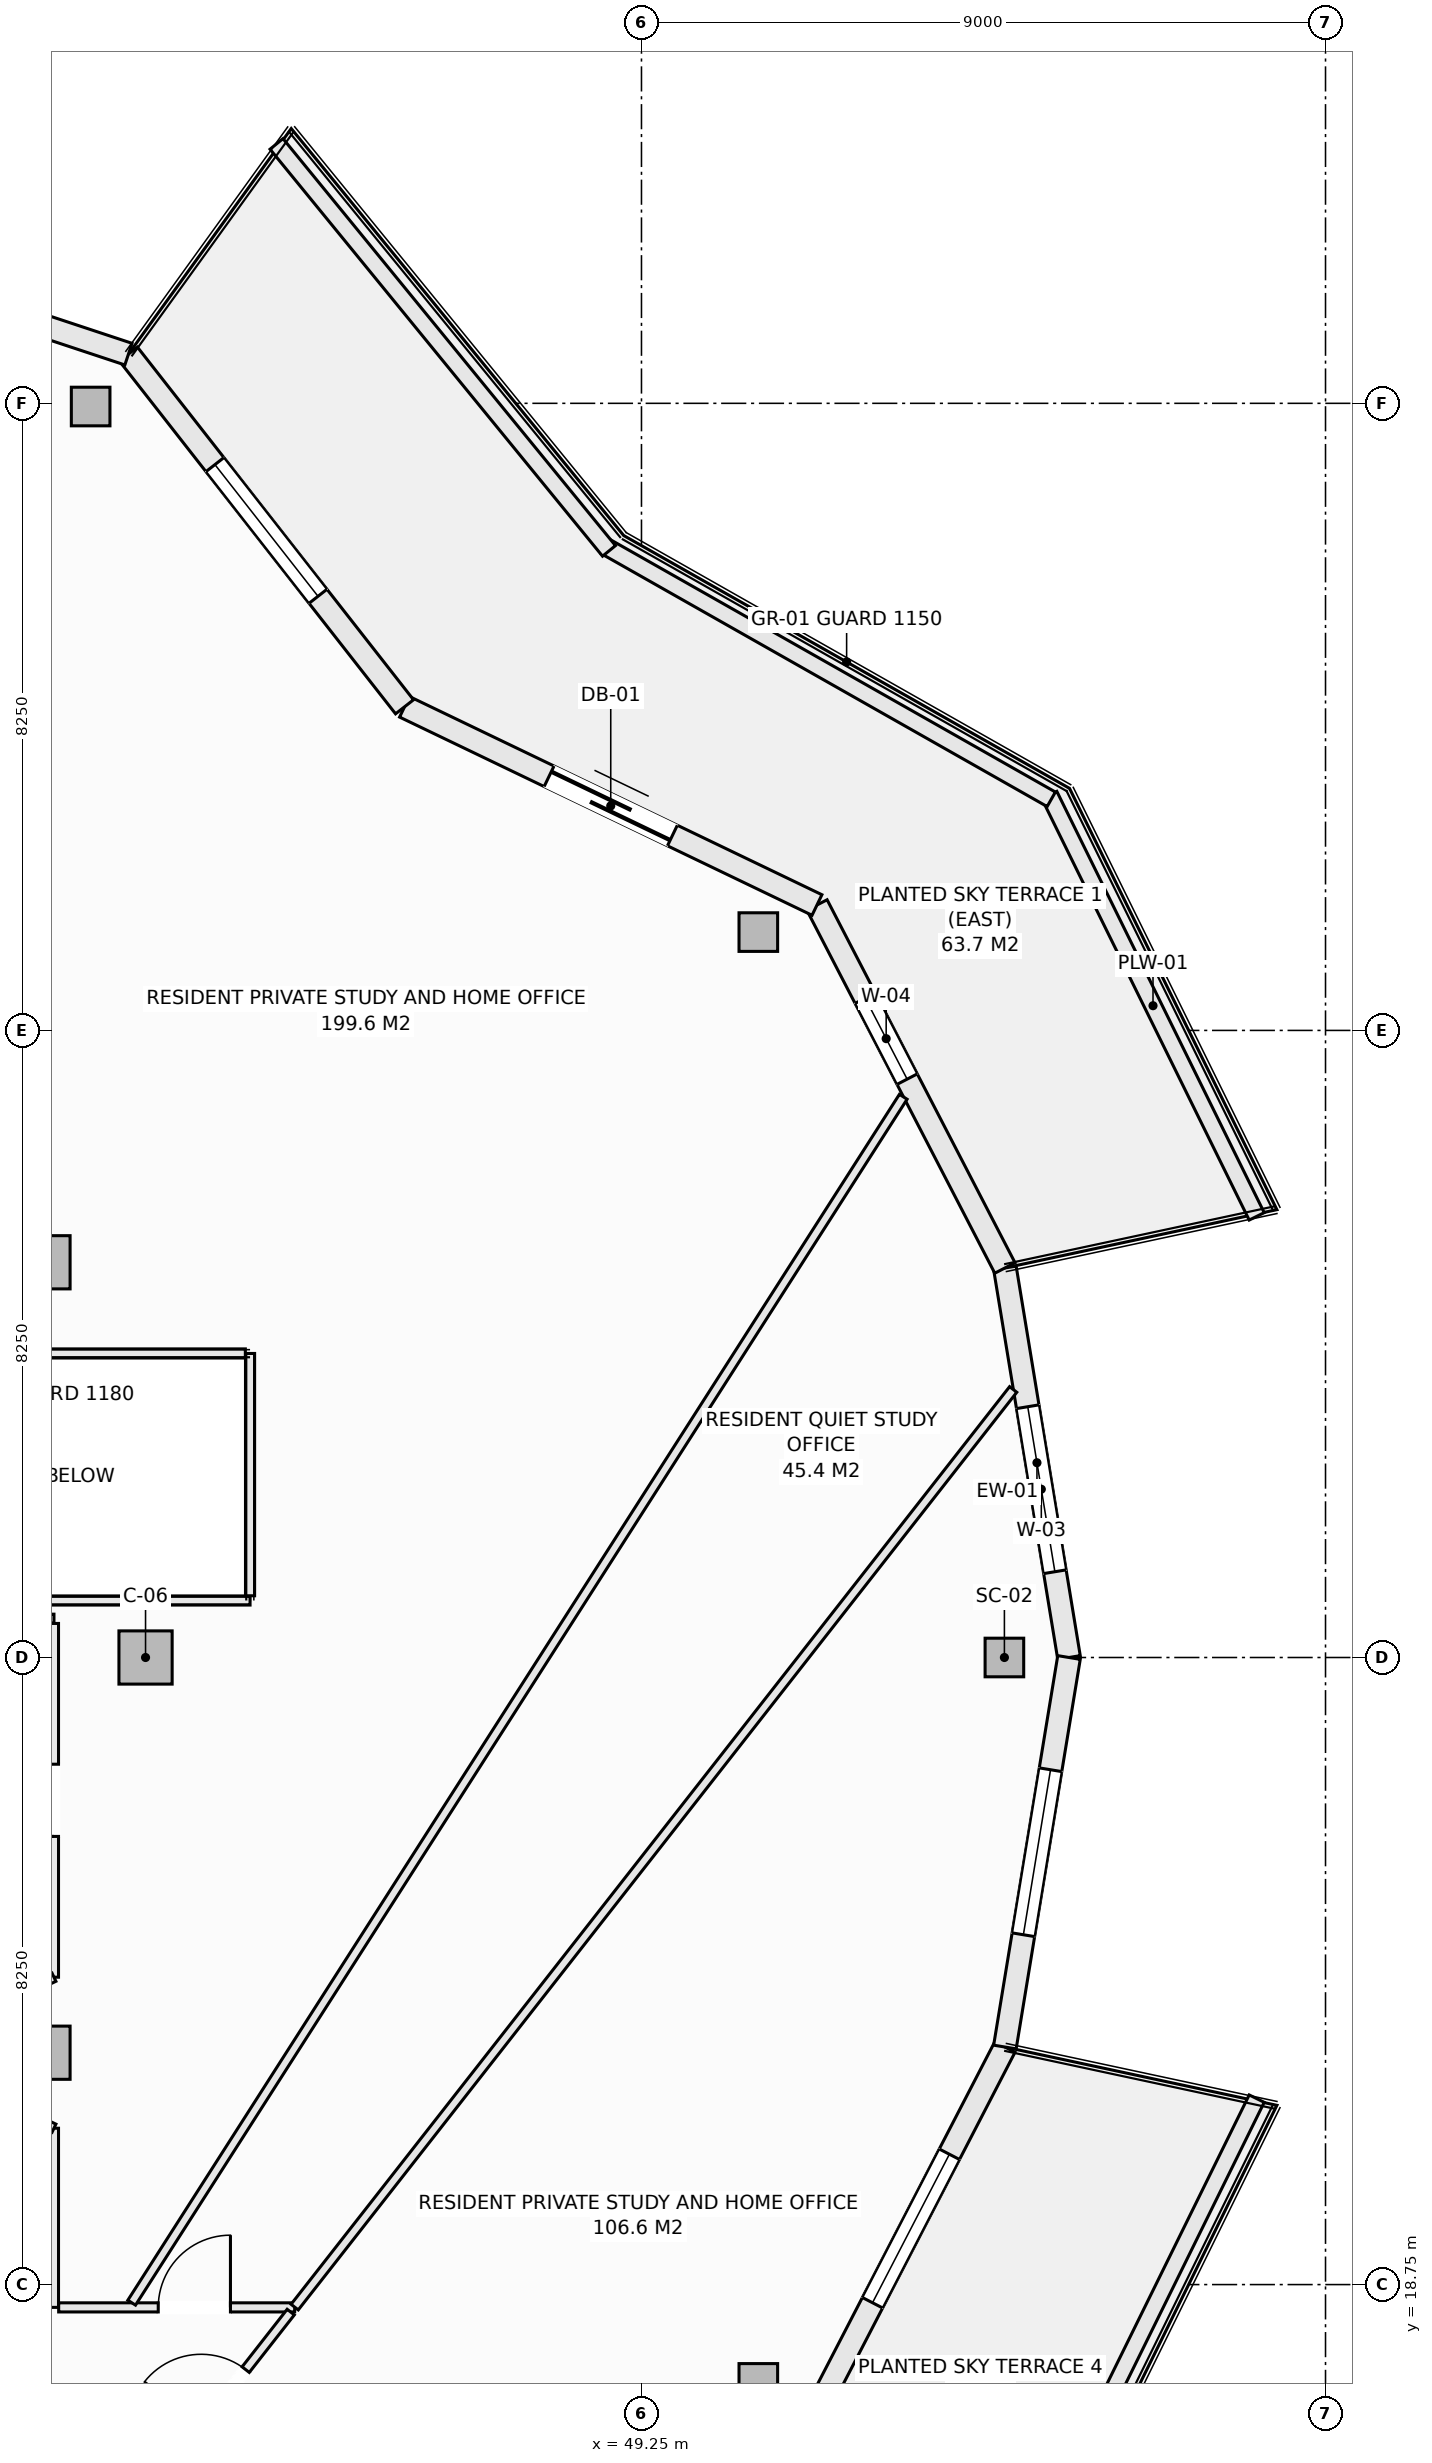
"""IFC4 building model, lengths in metres.
Left out: names, types, materials, properties, quantities, classifications, styles, units other than length and angle.
Written with IfcOpenShell. Run it as: python <this file> out.ifc"""

import sys

from ifc_helpers import new_model, si_unit, direction, frame, frame_2d, origin, origin_2d, place, context, subcontext, project, spatial, rectangle, hollow_rectangle, extrude, element, fill, save


model = new_model("IFC4")
c1 = context("Model", 3, precision=1e-05, world=origin(), true_north=direction((0.0, 1.0)))
c2 = subcontext(c1, "Body", "Model", "MODEL_VIEW")
j1 = project(units=[si_unit("LENGTHUNIT", "METRE"), si_unit("PLANEANGLEUNIT", "RADIAN")], contexts=[c1])
p1 = place(None, origin())
s1 = spatial("IfcSite", under=j1, at=p1, CompositionType="ELEMENT")
p2 = place(p1, origin())
s2 = spatial("IfcBuilding", under=s1, at=p2, CompositionType="ELEMENT")
p3 = place(p2, frame((0.0, 0.0, 209.6)))
s3 = spatial("IfcBuildingStorey", under=s2, at=p3, CompositionType="ELEMENT", Elevation=209.6)
for number, where, z_axis, x_axis in (
    (1, (54.025, 27.0, -0.27), (0.0, 0.0, 1.0), (1.0, 0.0, 0.0)),
    (2, (50.787, 36.544, -0.27), (0.0, 0.0, 1.0), (1.0, 0.0, 0.0)),
    (3, (42.003, 43.458, -0.27), (0.0, 0.0, 1.0), (1.0, 0.0, 0.0)),
    (4, (50.787, 17.456, -0.27), (0.0, 0.0, 1.0), (1.0, 0.0, 0.0)),
):
    element("IfcColumn", number, at=place(p3, frame(where, z_axis=z_axis, x_axis=x_axis)), inside=s3, PredefinedType="COLUMN", context=c2, shape_type="SweptSolid", body=[
        extrude(hollow_rectangle(XDim=0.508, YDim=0.508, WallThickness=0.019, at=origin_2d()), origin(), (0.0, 0.0, 1.0), 3.3),
    ])
for number, where, z_axis, x_axis in (
    (5, (42.725, 27.0, -0.27), (0.0, 0.0, 1.0), (1.0, 0.0, 0.0)),
    (6, (41.382, 32.199, -0.27), (0.0, 0.0, 1.0), (1.0, 0.0, 0.0)),
    (7, (41.382, 21.801, -0.27), (0.0, 0.0, 1.0), (1.0, 0.0, 0.0)),
):
    element("IfcColumn", number, at=place(p3, frame(where, z_axis=z_axis, x_axis=x_axis)), inside=s3, PredefinedType="COLUMN", context=c2, shape_type="SweptSolid", body=[
        extrude(rectangle(XDim=0.7, YDim=0.7, at=origin_2d()), origin(), (0.0, 0.0, 1.0), 3.3),
    ])
p4 = place(p3, frame((54.032, 32.125, 0.0), z_axis=(0.0, 0.0, 1.0), x_axis=(0.16237087798, -0.986729799886, 0.0)))
e8 = element("IfcWall", 8, at=p4, inside=s3, PredefinedType="SOLIDWALL", context=c2, shape_type="SweptSolid", body=[
    extrude(rectangle(XDim=5.193, YDim=0.3, at=frame_2d((2.597, 0.0))), origin(), (0.0, 0.0, 1.0), 2.605),
])
p5 = place(p4, frame((1.85, 0.0, 0.72)))
e9 = element("IfcOpeningElement", 9, at=p5, cuts=e8, PredefinedType="OPENING", context=c2, shape_type="SweptSolid", body=[
    extrude(rectangle(XDim=2.2, YDim=1.65, at=frame_2d((1.1, 0.825))), frame((0.0, 0.16, 0.0), z_axis=(0.0, -1.0, 0.0), x_axis=(1.0, 0.0, 0.0)), (0.0, 0.0, 1.0), 0.32),
])
p6 = place(p3, frame((51.559, 36.9, 0.0), z_axis=(0.0, 0.0, 1.0), x_axis=(0.459808219482, -0.888018243786, 0.0)))
e10 = element("IfcWall", 10, at=p6, inside=s3, PredefinedType="SOLIDWALL", context=c2, shape_type="SweptSolid", body=[
    extrude(rectangle(XDim=5.378, YDim=0.3, at=frame_2d((2.689, 0.0))), origin(), (0.0, 0.0, 1.0), 2.605),
])
p7 = place(p6, frame((1.38, 0.0, 0.72)))
e11 = element("IfcOpeningElement", 11, at=p7, cuts=e10, PredefinedType="OPENING", context=c2, shape_type="SweptSolid", body=[
    extrude(rectangle(XDim=1.2, YDim=1.65, at=frame_2d((0.6, 0.825))), frame((0.0, 0.16, 0.0), z_axis=(0.0, -1.0, 0.0), x_axis=(1.0, 0.0, 0.0)), (0.0, 0.0, 1.0), 0.32),
])
p8 = place(p3, frame((46.133, 39.507, 0.0), z_axis=(0.0, 0.0, 1.0), x_axis=(0.901348331142, -0.433094892545, 0.0)))
e12 = element("IfcWall", 12, at=p8, inside=s3, PredefinedType="SOLIDWALL", context=c2, shape_type="SweptSolid", body=[
    extrude(rectangle(XDim=6.021, YDim=0.3, at=frame_2d((3.01, 0.0))), origin(), (0.0, 0.0, 1.0), 2.605),
])
p9 = place(p8, frame((2.11, 0.0, 0.0)))
e13 = element("IfcOpeningElement", 13, at=p9, cuts=e12, PredefinedType="OPENING", context=c2, shape_type="SweptSolid", body=[
    extrude(rectangle(XDim=1.8, YDim=2.25, at=frame_2d((0.9, 1.125))), frame((0.0, 0.16, 0.0), z_axis=(0.0, -1.0, 0.0), x_axis=(1.0, 0.0, 0.0)), (0.0, 0.0, 1.0), 0.32),
])
p10 = place(p3, frame((42.5, 44.147, 0.0), z_axis=(0.0, 0.0, 1.0), x_axis=(0.616450126935, -0.787393955401, 0.0)))
e14 = element("IfcWall", 14, at=p10, inside=s3, PredefinedType="SOLIDWALL", context=c2, shape_type="SweptSolid", body=[
    extrude(rectangle(XDim=5.893, YDim=0.3, at=frame_2d((2.946, 0.0))), origin(), (0.0, 0.0, 1.0), 2.605),
])
p11 = place(p10, frame((1.846, 0.0, 0.72)))
e15 = element("IfcOpeningElement", 15, at=p11, cuts=e14, PredefinedType="OPENING", context=c2, shape_type="SweptSolid", body=[
    extrude(rectangle(XDim=2.2, YDim=1.65, at=frame_2d((1.1, 0.825))), frame((0.0, 0.16, 0.0), z_axis=(0.0, -1.0, 0.0), x_axis=(1.0, 0.0, 0.0)), (0.0, 0.0, 1.0), 0.32),
])
p12 = place(p3, frame((36.531, 46.125, 0.0), z_axis=(0.0, 0.0, 1.0), x_axis=(0.949240877604, -0.314550085495, 0.0)))
e16 = element("IfcWall", 16, at=p12, inside=s3, PredefinedType="SOLIDWALL", context=c2, shape_type="SweptSolid", body=[
    extrude(rectangle(XDim=6.288, YDim=0.3, at=frame_2d((3.144, 0.0))), origin(), (0.0, 0.0, 1.0), 2.605),
])
p13 = place(p12, frame((2.044, 0.0, 0.72)))
e17 = element("IfcOpeningElement", 17, at=p13, cuts=e16, PredefinedType="OPENING", context=c2, shape_type="SweptSolid", body=[
    extrude(rectangle(XDim=2.2, YDim=1.65, at=frame_2d((1.1, 0.825))), frame((0.0, 0.16, 0.0), z_axis=(0.0, -1.0, 0.0), x_axis=(1.0, 0.0, 0.0)), (0.0, 0.0, 1.0), 0.32),
])
p14 = place(p3, frame((51.559, 17.1, 0.0), z_axis=(0.0, 0.0, 1.0), x_axis=(0.459808219482, 0.888018243786, 0.0)))
e18 = element("IfcWall", 18, at=p14, inside=s3, PredefinedType="SOLIDWALL", context=c2, shape_type="SweptSolid", body=[
    extrude(rectangle(XDim=5.378, YDim=0.3, at=frame_2d((2.689, 0.0))), origin(), (0.0, 0.0, 1.0), 2.605),
])
p15 = place(p14, frame((1.589, 0.0, 0.72)))
e19 = element("IfcOpeningElement", 19, at=p15, cuts=e18, PredefinedType="OPENING", context=c2, shape_type="SweptSolid", body=[
    extrude(rectangle(XDim=2.2, YDim=1.65, at=frame_2d((1.1, 0.825))), frame((0.0, 0.16, 0.0), z_axis=(0.0, -1.0, 0.0), x_axis=(1.0, 0.0, 0.0)), (0.0, 0.0, 1.0), 0.32),
])
p16 = place(p3, frame((54.032, 21.875, 0.0), z_axis=(0.0, 0.0, 1.0), x_axis=(0.16237087798, 0.986729799886, 0.0)))
e20 = element("IfcWall", 20, at=p16, inside=s3, PredefinedType="SOLIDWALL", context=c2, shape_type="SweptSolid", body=[
    extrude(rectangle(XDim=5.193, YDim=0.3, at=frame_2d((2.597, 0.0))), origin(), (0.0, 0.0, 1.0), 2.605),
])
p17 = place(p16, frame((1.497, 0.0, 0.72)))
e21 = element("IfcOpeningElement", 21, at=p17, cuts=e20, PredefinedType="OPENING", context=c2, shape_type="SweptSolid", body=[
    extrude(rectangle(XDim=2.2, YDim=1.65, at=frame_2d((1.1, 0.825))), frame((0.0, 0.16, 0.0), z_axis=(0.0, -1.0, 0.0), x_axis=(1.0, 0.0, 0.0)), (0.0, 0.0, 1.0), 0.32),
])
p18 = place(p3, frame((54.616, 38.347, 0.0), z_axis=(0.0, 0.0, 1.0), x_axis=(0.441640961804, -0.897191875162, 0.0)))
e22 = element("IfcWall", 22, at=p18, inside=s3, PredefinedType="PARAPET", context=c2, shape_type="SweptSolid", body=[
    extrude(rectangle(XDim=6.178, YDim=0.22, at=frame_2d((3.089, 0.0))), origin(), (0.0, 0.0, 1.0), 0.52),
])
p19 = place(p3, frame((48.776, 41.617, 0.0), z_axis=(0.0, 0.0, 1.0), x_axis=(0.869860619267, -0.493297580623, 0.0)))
e23 = element("IfcWall", 23, at=p19, inside=s3, PredefinedType="PARAPET", context=c2, shape_type="SweptSolid", body=[
    extrude(rectangle(XDim=6.743, YDim=0.22, at=frame_2d((3.371, 0.0))), origin(), (0.0, 0.0, 1.0), 0.52),
])
p20 = place(p3, frame((44.448, 46.913, 0.0), z_axis=(0.0, 0.0, 1.0), x_axis=(0.632697312147, -0.774399193699, 0.0)))
e24 = element("IfcWall", 24, at=p20, inside=s3, PredefinedType="PARAPET", context=c2, shape_type="SweptSolid", body=[
    extrude(rectangle(XDim=6.914, YDim=0.22, at=frame_2d((3.457, 0.0))), origin(), (0.0, 0.0, 1.0), 0.52),
])
p21 = place(p3, frame((54.616, 15.653, 0.0), z_axis=(0.0, 0.0, 1.0), x_axis=(0.441640961804, 0.897191875162, 0.0)))
e25 = element("IfcWall", 25, at=p21, inside=s3, PredefinedType="PARAPET", context=c2, shape_type="SweptSolid", body=[
    extrude(rectangle(XDim=6.178, YDim=0.22, at=frame_2d((3.089, 0.0))), origin(), (0.0, 0.0, 1.0), 0.52),
])
p22 = place(p3, frame((39.662, 27.51, 0.0), z_axis=(0.0, 0.0, 1.0), x_axis=(1.0, 0.0, 0.0)))
e26 = element("IfcWall", 26, at=p22, inside=s3, PredefinedType="PARTITIONING", context=c2, shape_type="SweptSolid", body=[
    extrude(rectangle(XDim=1.858, YDim=0.12, at=frame_2d((0.929, 0.0))), origin(), (0.0, 0.0, 1.0), 3.03),
])
p23 = place(p3, frame((41.52, 18.45, 0.0), z_axis=(0.0, 0.0, 1.0), x_axis=(0.0, 1.0, 0.0)))
e27 = element("IfcWall", 27, at=p23, inside=s3, PredefinedType="PARTITIONING", context=c2, shape_type="SweptSolid", body=[
    extrude(rectangle(XDim=2.357, YDim=0.12, at=frame_2d((1.178, 0.0))), origin(), (0.0, 0.0, 1.0), 3.03),
])
p24 = place(p3, frame((41.52, 22.794, 0.0), z_axis=(0.0, 0.0, 1.0), x_axis=(0.0, 1.0, 0.0)))
e28 = element("IfcWall", 28, at=p24, inside=s3, PredefinedType="PARTITIONING", context=c2, shape_type="SweptSolid", body=[
    extrude(rectangle(XDim=4.654, YDim=0.12, at=frame_2d((2.327, 0.0))), origin(), (0.0, 0.0, 1.0), 2.478),
])
p25 = place(p24, frame((1.852, 0.0, 0.0)))
e29 = element("IfcOpeningElement", 29, at=p25, cuts=e28, PredefinedType="OPENING", context=c2, shape_type="SweptSolid", body=[
    extrude(rectangle(XDim=0.95, YDim=2.1, at=frame_2d((0.475, 1.05))), frame((0.0, 0.07, 0.0), z_axis=(0.0, -1.0, 0.0), x_axis=(1.0, 0.0, 0.0)), (0.0, 0.0, 1.0), 0.14),
])
for number, where, z_axis, x_axis in (
    (30, (40.986, 22.541, 0.0), (0.0, 0.0, 1.0), (0.904, 0.428, 0.0)),
    (31, (40.986, 21.06, 0.0), (0.0, 0.0, 1.0), (0.904, -0.428, 0.0)),
):
    element("IfcWall", number, at=place(p3, frame(where, z_axis=z_axis, x_axis=x_axis)), inside=s3, PredefinedType="PARTITIONING", context=c2, shape_type="SweptSolid", body=[
        extrude(rectangle(XDim=0.591, YDim=0.12, at=frame_2d((0.295, 0.0))), origin(), (0.0, 0.0, 1.0), 3.03),
    ])
p26 = place(p3, frame((41.582, 18.45, 0.0), z_axis=(0.0, 0.0, 1.0), x_axis=(1.0, 0.0, 0.0)))
e32 = element("IfcWall", 32, at=p26, inside=s3, PredefinedType="PARTITIONING", context=c2, shape_type="SweptSolid", body=[
    extrude(rectangle(XDim=3.105, YDim=0.12, at=frame_2d((1.552, 0.0))), origin(), (0.0, 0.0, 1.0), 3.03),
])
p27 = place(p26, frame((1.31, 0.0, 0.0)))
e33 = element("IfcOpeningElement", 33, at=p27, cuts=e32, PredefinedType="OPENING", context=c2, shape_type="SweptSolid", body=[
    extrude(rectangle(XDim=0.95, YDim=2.1, at=frame_2d((0.475, 1.05))), frame((0.0, 0.07, 0.0), z_axis=(0.0, -1.0, 0.0), x_axis=(1.0, 0.0, 0.0)), (0.0, 0.0, 1.0), 0.14),
])
p28 = place(p3, frame((36.527, 8.034, 0.0), z_axis=(0.0, 0.0, 1.0), x_axis=(0.616547497682, 0.787317714206, 0.0)))
e34 = element("IfcWall", 34, at=p28, inside=s3, PredefinedType="PARTITIONING", context=c2, shape_type="SweptSolid", body=[
    extrude(rectangle(XDim=13.151, YDim=0.12, at=frame_2d((6.576, 0.0))), origin(), (0.0, 0.0, 1.0), 3.03),
])
p29 = place(p28, frame((11.24, 0.0, 0.0)))
e35 = element("IfcOpeningElement", 35, at=p29, cuts=e34, PredefinedType="OPENING", context=c2, shape_type="SweptSolid", body=[
    extrude(rectangle(XDim=0.95, YDim=2.1, at=frame_2d((0.475, 1.05))), frame((0.0, 0.07, 0.0), z_axis=(0.0, -1.0, 0.0), x_axis=(1.0, 0.0, 0.0)), (0.0, 0.0, 1.0), 0.14),
])
p30 = place(p3, frame((44.687, 18.454, 0.0), z_axis=(0.0, 0.0, 1.0), x_axis=(0.616533198311, 0.787328911815, 0.0)))
e36 = element("IfcWall", 36, at=p30, inside=s3, PredefinedType="PARTITIONING", context=c2, shape_type="SweptSolid", body=[
    extrude(rectangle(XDim=15.333, YDim=0.12, at=frame_2d((7.667, 0.0))), origin(), (0.0, 0.0, 1.0), 3.03),
])
p31 = place(p3, frame((42.542, 18.512, 0.0), z_axis=(0.0, 0.0, 1.0), x_axis=(0.538988222434, 0.842313300428, 0.0)))
e37 = element("IfcWall", 37, at=p31, inside=s3, PredefinedType="PARTITIONING", context=c2, shape_type="SweptSolid", body=[
    extrude(rectangle(XDim=18.835, YDim=0.12, at=frame_2d((9.417, 0.0))), origin(), (0.0, 0.0, 1.0), 3.03),
])
p32 = place(p3, frame((39.146, 27.75, 0.0), z_axis=(0.0, 0.0, 1.0), x_axis=(1.0, 0.0, 0.0)))
e38 = element("IfcWall", 38, at=p32, inside=s3, PredefinedType="PARTITIONING", context=c2, shape_type="SweptSolid", body=[
    extrude(rectangle(XDim=4.955, YDim=0.12, at=frame_2d((2.477, 0.0))), origin(), (0.0, 0.0, 1.0), 3.03),
])
p33 = place(p3, frame((44.1, 27.812, 0.0), z_axis=(0.0, 0.0, 1.0), x_axis=(0.0, 1.0, 0.0)))
e39 = element("IfcWall", 39, at=p33, inside=s3, PredefinedType="PARTITIONING", context=c2, shape_type="SweptSolid", body=[
    extrude(rectangle(XDim=3.188, YDim=0.12, at=frame_2d((1.594, 0.0))), origin(), (0.0, 0.0, 1.0), 3.03),
])
p34 = place(p3, frame((38.738, 31.0, 0.0), z_axis=(0.0, 0.0, 1.0), x_axis=(1.0, 0.0, 0.0)))
e40 = element("IfcWall", 40, at=p34, inside=s3, PredefinedType="PARTITIONING", context=c2, shape_type="SweptSolid", body=[
    extrude(rectangle(XDim=5.3, YDim=0.12, at=frame_2d((2.65, 0.0))), origin(), (0.0, 0.0, 1.0), 3.03),
])
p35 = place(p5, origin())
e41 = element("IfcWindow", 41, at=p35, inside=s3, PartitioningType="SINGLE_PANEL", PredefinedType="WINDOW", context=c2, shape_type="SweptSolid", body=[
    extrude(rectangle(XDim=2.2, YDim=1.65, at=frame_2d((1.1, 0.825))), frame((0.0, 0.03, 0.0), z_axis=(0.0, -1.0, 0.0), x_axis=(1.0, 0.0, 0.0)), (0.0, 0.0, 1.0), 0.06),
])
fill(e9, e41)
p36 = place(p7, origin())
e42 = element("IfcWindow", 42, at=p36, inside=s3, PartitioningType="SINGLE_PANEL", PredefinedType="WINDOW", context=c2, shape_type="SweptSolid", body=[
    extrude(rectangle(XDim=1.2, YDim=1.65, at=frame_2d((0.6, 0.825))), frame((0.0, 0.03, 0.0), z_axis=(0.0, -1.0, 0.0), x_axis=(1.0, 0.0, 0.0)), (0.0, 0.0, 1.0), 0.06),
])
fill(e11, e42)
p37 = place(p9, origin())
e43 = element("IfcDoor", 43, at=p37, inside=s3, OperationType="SLIDING_TO_LEFT", PredefinedType="DOOR", context=c2, shape_type="SweptSolid", body=[
    extrude(rectangle(XDim=1.8, YDim=2.25, at=frame_2d((0.9, 1.125))), frame((0.0, 0.025, 0.0), z_axis=(0.0, -1.0, 0.0), x_axis=(1.0, 0.0, 0.0)), (0.0, 0.0, 1.0), 0.05),
])
fill(e13, e43)
p38 = place(p11, origin())
e44 = element("IfcWindow", 44, at=p38, inside=s3, PartitioningType="SINGLE_PANEL", PredefinedType="WINDOW", context=c2, shape_type="SweptSolid", body=[
    extrude(rectangle(XDim=2.2, YDim=1.65, at=frame_2d((1.1, 0.825))), frame((0.0, 0.03, 0.0), z_axis=(0.0, -1.0, 0.0), x_axis=(1.0, 0.0, 0.0)), (0.0, 0.0, 1.0), 0.06),
])
fill(e15, e44)
p39 = place(p15, origin())
e45 = element("IfcWindow", 45, at=p39, inside=s3, PartitioningType="SINGLE_PANEL", PredefinedType="WINDOW", context=c2, shape_type="SweptSolid", body=[
    extrude(rectangle(XDim=2.2, YDim=1.65, at=frame_2d((1.1, 0.825))), frame((0.0, 0.03, 0.0), z_axis=(0.0, -1.0, 0.0), x_axis=(1.0, 0.0, 0.0)), (0.0, 0.0, 1.0), 0.06),
])
fill(e19, e45)
p40 = place(p17, origin())
e46 = element("IfcWindow", 46, at=p40, inside=s3, PartitioningType="SINGLE_PANEL", PredefinedType="WINDOW", context=c2, shape_type="SweptSolid", body=[
    extrude(rectangle(XDim=2.2, YDim=1.65, at=frame_2d((1.1, 0.825))), frame((0.0, 0.03, 0.0), z_axis=(0.0, -1.0, 0.0), x_axis=(1.0, 0.0, 0.0)), (0.0, 0.0, 1.0), 0.06),
])
fill(e21, e46)
p41 = place(p29, origin())
e47 = element("IfcDoor", 47, at=p41, inside=s3, OperationType="SINGLE_SWING_LEFT", PredefinedType="DOOR", context=c2, shape_type="SweptSolid", body=[
    extrude(rectangle(XDim=0.95, YDim=2.1, at=frame_2d((0.475, 1.05))), frame((0.0, 0.025, 0.0), z_axis=(0.0, -1.0, 0.0), x_axis=(1.0, 0.0, 0.0)), (0.0, 0.0, 1.0), 0.05),
])
fill(e35, e47)
p42 = place(p27, origin())
e48 = element("IfcDoor", 48, at=p42, inside=s3, OperationType="SINGLE_SWING_RIGHT", PredefinedType="DOOR", context=c2, shape_type="SweptSolid", body=[
    extrude(rectangle(XDim=0.95, YDim=2.1, at=frame_2d((0.475, 1.05))), frame((0.0, 0.025, 0.0), z_axis=(0.0, -1.0, 0.0), x_axis=(1.0, 0.0, 0.0)), (0.0, 0.0, 1.0), 0.05),
])
fill(e33, e48)
p43 = place(p25, origin())
e49 = element("IfcDoor", 49, at=p43, inside=s3, OperationType="SINGLE_SWING_LEFT", PredefinedType="DOOR", context=c2, shape_type="SweptSolid", body=[
    extrude(rectangle(XDim=0.95, YDim=2.1, at=frame_2d((0.475, 1.05))), frame((0.0, 0.025, 0.0), z_axis=(0.0, -1.0, 0.0), x_axis=(1.0, 0.0, 0.0)), (0.0, 0.0, 1.0), 0.05),
])
fill(e29, e49)
save(model, sys.argv[1])
